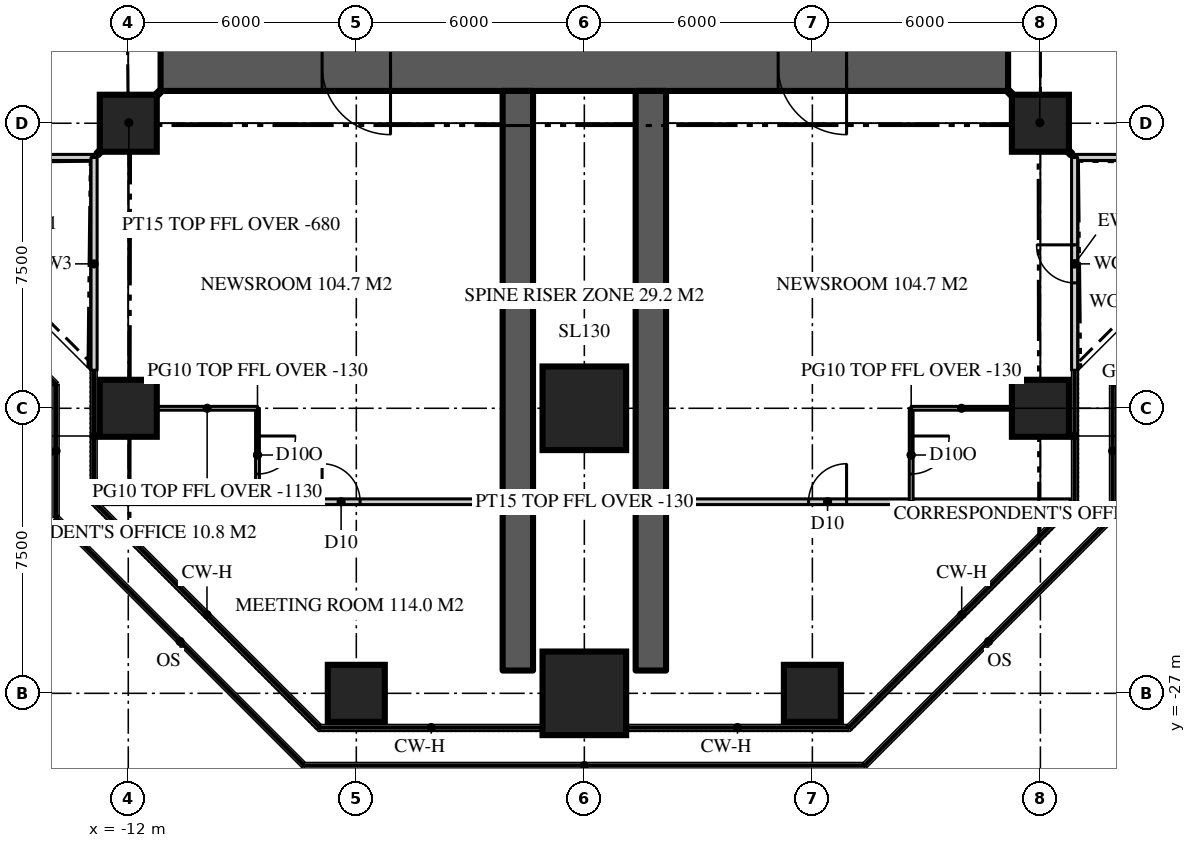
"""IFC4 building model, lengths in metres.
Left out: names, types, materials, properties, quantities, classifications, styles, units other than length and angle.
Written with IfcOpenShell. Run it as: python <this file> out.ifc"""

import sys

from ifc_helpers import new_model, si_unit, direction, frame, frame_2d, origin, origin_2d, place, context, subcontext, project, spatial, rectangle, extrude, element, fill, save


model = new_model("IFC4")
c1 = context("Model", 3, precision=1e-05, world=origin(), true_north=direction((0.0, 1.0)))
c2 = subcontext(c1, "Body", "Model", "MODEL_VIEW")
j1 = project(units=[si_unit("LENGTHUNIT", "METRE"), si_unit("PLANEANGLEUNIT", "RADIAN")], contexts=[c1])
p1 = place(None, origin())
s1 = spatial("IfcSite", under=j1, at=p1, CompositionType="ELEMENT")
p2 = place(p1, origin())
s2 = spatial("IfcBuilding", under=s1, at=p2, CompositionType="ELEMENT")
p3 = place(p2, frame((0.0, 0.0, 240.0)))
s3 = spatial("IfcBuildingStorey", under=s2, at=p3, CompositionType="ELEMENT", Elevation=240.0)
p4 = place(p3, frame((11.15, -10.5, 0.0), z_axis=(0.0, 0.0, 1.0), x_axis=(-1.0, 0.0, 0.0)))
e1 = element("IfcWall", 1, at=p4, inside=s3, PredefinedType="SHEAR", context=c2, shape_type="SweptSolid", body=[
    extrude(rectangle(XDim=22.3, YDim=1.3, at=frame_2d((11.15, 0.0))), origin(), (0.0, 0.0, 1.0), 3.9),
])
p5 = place(p4, frame((16.25, 0.0, 0.0)))
e2 = element("IfcOpeningElement", 2, at=p5, cuts=e1, PredefinedType="OPENING", context=c2, shape_type="SweptSolid", body=[
    extrude(rectangle(XDim=1.8, YDim=2.2, at=frame_2d((0.9, 1.1))), frame((0.0, 0.66, 0.0), z_axis=(0.0, -1.0, 0.0), x_axis=(1.0, 0.0, 0.0)), (0.0, 0.0, 1.0), 1.32),
])
p6 = place(p4, frame((4.25, 0.0, 0.0)))
e3 = element("IfcOpeningElement", 3, at=p6, cuts=e1, PredefinedType="OPENING", context=c2, shape_type="SweptSolid", body=[
    extrude(rectangle(XDim=1.8, YDim=2.2, at=frame_2d((0.9, 1.1))), frame((0.0, 0.66, 0.0), z_axis=(0.0, -1.0, 0.0), x_axis=(1.0, 0.0, 0.0)), (0.0, 0.0, 1.0), 1.32),
])
for number, where, z_axis, x_axis in (
    (4, (-1.75, -11.15, 0.0), (0.0, 0.0, 1.0), (0.0, -1.0, 0.0)),
    (5, (1.75, -11.15, 0.0), (0.0, 0.0, 1.0), (0.0, -1.0, 0.0)),
):
    element("IfcWall", number, at=place(p3, frame(where, z_axis=z_axis, x_axis=x_axis)), inside=s3, PredefinedType="SHEAR", context=c2, shape_type="SweptSolid", body=[
        extrude(rectangle(XDim=15.25, YDim=0.8, at=frame_2d((7.625, 0.0))), origin(), (0.0, 0.0, 1.0), 3.9),
    ])
p7 = place(p3, frame((-6.0, -27.0, 0.0), z_axis=(0.0, 0.0, 1.0), x_axis=(1.0, 0.0, 0.0)))
e6 = element("IfcColumn", 6, at=p7, inside=s3, PredefinedType="COLUMN", context=c2, shape_type="SweptSolid", body=[
    extrude(rectangle(XDim=1.5, YDim=1.5, at=origin_2d()), origin(), (0.0, 0.0, 1.0), 3.9),
])
p8 = place(p3, frame((0.0, -27.0, 0.0), z_axis=(0.0, 0.0, 1.0), x_axis=(1.0, 0.0, 0.0)))
e7 = element("IfcColumn", 7, at=p8, inside=s3, PredefinedType="COLUMN", context=c2, shape_type="SweptSolid", body=[
    extrude(rectangle(XDim=2.2, YDim=2.2, at=origin_2d()), origin(), (0.0, 0.0, 1.0), 3.9),
])
for number, where, z_axis, x_axis in (
    (8, (6.0, -27.0, 0.0), (0.0, 0.0, 1.0), (1.0, 0.0, 0.0)),
    (9, (-12.0, -19.5, 0.0), (0.0, 0.0, 1.0), (1.0, 0.0, 0.0)),
):
    element("IfcColumn", number, at=place(p3, frame(where, z_axis=z_axis, x_axis=x_axis)), inside=s3, PredefinedType="COLUMN", context=c2, shape_type="SweptSolid", body=[
        extrude(rectangle(XDim=1.5, YDim=1.5, at=origin_2d()), origin(), (0.0, 0.0, 1.0), 3.9),
    ])
p9 = place(p3, frame((0.0, -19.5, 0.0), z_axis=(0.0, 0.0, 1.0), x_axis=(1.0, 0.0, 0.0)))
e10 = element("IfcColumn", 10, at=p9, inside=s3, PredefinedType="COLUMN", context=c2, shape_type="SweptSolid", body=[
    extrude(rectangle(XDim=2.2, YDim=2.2, at=origin_2d()), origin(), (0.0, 0.0, 1.0), 3.9),
])
for number, where, z_axis, x_axis in (
    (11, (12.0, -19.5, 0.0), (0.0, 0.0, 1.0), (1.0, 0.0, 0.0)),
    (12, (-12.0, -12.0, 0.0), (0.0, 0.0, 1.0), (1.0, 0.0, 0.0)),
    (13, (12.0, -12.0, 0.0), (0.0, 0.0, 1.0), (1.0, 0.0, 0.0)),
):
    element("IfcColumn", number, at=place(p3, frame(where, z_axis=z_axis, x_axis=x_axis)), inside=s3, PredefinedType="COLUMN", context=c2, shape_type="SweptSolid", body=[
        extrude(rectangle(XDim=1.5, YDim=1.5, at=origin_2d()), origin(), (0.0, 0.0, 1.0), 3.9),
    ])
p10 = place(p3, frame((12.9, -12.9, 0.0), z_axis=(0.0, 0.0, 1.0), x_axis=(1.0, 0.0, 0.0)))
e14 = element("IfcWall", 14, at=p10, inside=s3, PredefinedType="SOLIDWALL", context=c2, shape_type="SweptSolid", body=[
    extrude(rectangle(XDim=5.6, YDim=0.16, at=frame_2d((2.8, 0.0))), origin(), (0.0, 0.0, 1.0), 3.77),
])
p11 = place(p3, frame((-18.5, -12.9, 0.0), z_axis=(0.0, 0.0, 1.0), x_axis=(1.0, 0.0, 0.0)))
e15 = element("IfcWall", 15, at=p11, inside=s3, PredefinedType="SOLIDWALL", context=c2, shape_type="SweptSolid", body=[
    extrude(rectangle(XDim=5.6, YDim=0.16, at=frame_2d((2.8, 0.0))), origin(), (0.0, 0.0, 1.0), 3.77),
])
p12 = place(p11, frame((2.3, 0.0, 0.0)))
e16 = element("IfcOpeningElement", 16, at=p12, cuts=e15, PredefinedType="OPENING", context=c2, shape_type="SweptSolid", body=[
    extrude(rectangle(XDim=1.0, YDim=2.2, at=frame_2d((0.5, 1.1))), frame((0.0, 0.09, 0.0), z_axis=(0.0, -1.0, 0.0), x_axis=(1.0, 0.0, 0.0)), (0.0, 0.0, 1.0), 0.18),
])
p13 = place(p3, frame((-12.9, -12.9, 0.0), z_axis=(0.0, 0.0, 1.0), x_axis=(0.0, -1.0, 0.0)))
e17 = element("IfcWall", 17, at=p13, inside=s3, PredefinedType="SOLIDWALL", context=c2, shape_type="SweptSolid", body=[
    extrude(rectangle(XDim=5.6, YDim=0.16, at=frame_2d((2.8, 0.0))), origin(), (0.0, 0.0, 1.0), 3.77),
])
p14 = place(p3, frame((12.9, -18.5, 0.0), z_axis=(0.0, 0.0, 1.0), x_axis=(0.0, 1.0, 0.0)))
e18 = element("IfcWall", 18, at=p14, inside=s3, PredefinedType="SOLIDWALL", context=c2, shape_type="SweptSolid", body=[
    extrude(rectangle(XDim=5.6, YDim=0.16, at=frame_2d((2.8, 0.0))), origin(), (0.0, 0.0, 1.0), 3.77),
])
p15 = place(p14, frame((2.3, 0.0, 0.0)))
e19 = element("IfcOpeningElement", 19, at=p15, cuts=e18, PredefinedType="OPENING", context=c2, shape_type="SweptSolid", body=[
    extrude(rectangle(XDim=1.0, YDim=2.2, at=frame_2d((0.5, 1.1))), frame((0.0, 0.09, 0.0), z_axis=(0.0, -1.0, 0.0), x_axis=(1.0, 0.0, 0.0)), (0.0, 0.0, 1.0), 0.18),
])
p16 = place(p3, frame((-12.786, -21.959, 0.0), z_axis=(0.0, 0.0, 1.0), x_axis=(1.0, 0.0, 0.0)))
e20 = element("IfcWall", 20, at=p16, inside=s3, PredefinedType="PARTITIONING", context=c2, shape_type="SweptSolid", body=[
    extrude(rectangle(XDim=25.573, YDim=0.15, at=frame_2d((12.786, 0.0))), origin(), (0.0, 0.0, 1.0), 3.77),
])
p17 = place(p16, frame((18.687, 0.0, 0.0)))
e21 = element("IfcOpeningElement", 21, at=p17, cuts=e20, PredefinedType="OPENING", context=c2, shape_type="SweptSolid", body=[
    extrude(rectangle(XDim=1.0, YDim=2.2, at=frame_2d((0.5, 1.1))), frame((0.0, 0.085, 0.0), z_axis=(0.0, -1.0, 0.0), x_axis=(1.0, 0.0, 0.0)), (0.0, 0.0, 1.0), 0.17),
])
p18 = place(p16, frame((5.886, 0.0, 0.0)))
e22 = element("IfcOpeningElement", 22, at=p18, cuts=e20, PredefinedType="OPENING", context=c2, shape_type="SweptSolid", body=[
    extrude(rectangle(XDim=1.0, YDim=2.2, at=frame_2d((0.5, 1.1))), frame((0.0, 0.085, 0.0), z_axis=(0.0, -1.0, 0.0), x_axis=(1.0, 0.0, 0.0)), (0.0, 0.0, 1.0), 0.17),
])
p19 = place(p3, frame((8.6, -19.5, 0.0), z_axis=(0.0, 0.0, 1.0), x_axis=(0.0, -1.0, 0.0)))
e23 = element("IfcWall", 23, at=p19, inside=s3, PredefinedType="PARTITIONING", context=c2, shape_type="SweptSolid", body=[
    extrude(rectangle(XDim=2.459, YDim=0.1, at=frame_2d((1.229, 0.0))), origin(), (0.0, 0.0, 1.0), 3.77),
])
p20 = place(p19, frame((0.729, 0.0, 0.0)))
e24 = element("IfcOpeningElement", 24, at=p20, cuts=e23, PredefinedType="OPENING", context=c2, shape_type="SweptSolid", body=[
    extrude(rectangle(XDim=1.0, YDim=2.2, at=frame_2d((0.5, 1.1))), frame((0.0, 0.06, 0.0), z_axis=(0.0, -1.0, 0.0), x_axis=(1.0, 0.0, 0.0)), (0.0, 0.0, 1.0), 0.12),
])
p21 = place(p3, frame((8.6, -19.5, 0.0), z_axis=(0.0, 0.0, 1.0), x_axis=(1.0, 0.0, 0.0)))
e25 = element("IfcWall", 25, at=p21, inside=s3, PredefinedType="PARTITIONING", context=c2, shape_type="SweptSolid", body=[
    extrude(rectangle(XDim=2.65, YDim=0.1, at=frame_2d((1.325, 0.0))), origin(), (0.0, 0.0, 1.0), 2.77),
])
p22 = place(p3, frame((-8.6, -19.5, 0.0), z_axis=(0.0, 0.0, 1.0), x_axis=(0.0, -1.0, 0.0)))
e26 = element("IfcWall", 26, at=p22, inside=s3, PredefinedType="PARTITIONING", context=c2, shape_type="SweptSolid", body=[
    extrude(rectangle(XDim=2.459, YDim=0.1, at=frame_2d((1.229, 0.0))), origin(), (0.0, 0.0, 1.0), 3.77),
])
p23 = place(p22, frame((0.729, 0.0, 0.0)))
e27 = element("IfcOpeningElement", 27, at=p23, cuts=e26, PredefinedType="OPENING", context=c2, shape_type="SweptSolid", body=[
    extrude(rectangle(XDim=1.0, YDim=2.2, at=frame_2d((0.5, 1.1))), frame((0.0, 0.06, 0.0), z_axis=(0.0, -1.0, 0.0), x_axis=(1.0, 0.0, 0.0)), (0.0, 0.0, 1.0), 0.12),
])
p24 = place(p3, frame((-8.6, -19.5, 0.0), z_axis=(0.0, 0.0, 1.0), x_axis=(-1.0, 0.0, 0.0)))
e28 = element("IfcWall", 28, at=p24, inside=s3, PredefinedType="PARTITIONING", context=c2, shape_type="SweptSolid", body=[
    extrude(rectangle(XDim=2.65, YDim=0.1, at=frame_2d((1.325, 0.0))), origin(), (0.0, 0.0, 1.0), 2.77),
])
for number, where, z_axis, x_axis in (
    (29, (-11.15, -11.15, 0.0), (0.0, 0.0, 1.0), (-0.707, -0.707, 0.0)),
    (30, (11.15, -11.15, 0.0), (0.0, 0.0, 1.0), (0.707, -0.707, 0.0)),
):
    element("IfcWall", number, at=place(p3, frame(where, z_axis=z_axis, x_axis=x_axis)), inside=s3, PredefinedType="PARTITIONING", context=c2, shape_type="SweptSolid", body=[
        extrude(rectangle(XDim=2.362, YDim=0.15, at=frame_2d((1.181, 0.0))), origin(), (0.0, 0.0, 1.0), 3.22),
    ])
p25 = place(p15, origin())
e31 = element("IfcDoor", 31, at=p25, inside=s3, OperationType="SINGLE_SWING_RIGHT", PredefinedType="DOOR", context=c2, shape_type="SweptSolid", body=[
    extrude(rectangle(XDim=1.0, YDim=2.2, at=frame_2d((0.5, 1.1))), frame((0.0, 0.025, 0.0), z_axis=(0.0, -1.0, 0.0), x_axis=(1.0, 0.0, 0.0)), (0.0, 0.0, 1.0), 0.05),
])
fill(e19, e31)
p26 = place(p5, origin())
e32 = element("IfcDoor", 32, at=p26, inside=s3, OperationType="DOUBLE_DOOR_DOUBLE_SWING", PredefinedType="DOOR", context=c2, shape_type="SweptSolid", body=[
    extrude(rectangle(XDim=1.8, YDim=2.2, at=frame_2d((0.9, 1.1))), frame((0.0, 0.025, 0.0), z_axis=(0.0, -1.0, 0.0), x_axis=(1.0, 0.0, 0.0)), (0.0, 0.0, 1.0), 0.05),
])
fill(e2, e32)
p27 = place(p6, origin())
e33 = element("IfcDoor", 33, at=p27, inside=s3, OperationType="DOUBLE_DOOR_DOUBLE_SWING", PredefinedType="DOOR", context=c2, shape_type="SweptSolid", body=[
    extrude(rectangle(XDim=1.8, YDim=2.2, at=frame_2d((0.9, 1.1))), frame((0.0, 0.025, 0.0), z_axis=(0.0, -1.0, 0.0), x_axis=(1.0, 0.0, 0.0)), (0.0, 0.0, 1.0), 0.05),
])
fill(e3, e33)
p28 = place(p17, origin())
e34 = element("IfcDoor", 34, at=p28, inside=s3, OperationType="SINGLE_SWING_RIGHT", PredefinedType="DOOR", context=c2, shape_type="SweptSolid", body=[
    extrude(rectangle(XDim=1.0, YDim=2.2, at=frame_2d((0.5, 1.1))), frame((0.0, 0.025, 0.0), z_axis=(0.0, -1.0, 0.0), x_axis=(1.0, 0.0, 0.0)), (0.0, 0.0, 1.0), 0.05),
])
fill(e21, e34)
p29 = place(p18, origin())
e35 = element("IfcDoor", 35, at=p29, inside=s3, OperationType="SINGLE_SWING_LEFT", PredefinedType="DOOR", context=c2, shape_type="SweptSolid", body=[
    extrude(rectangle(XDim=1.0, YDim=2.2, at=frame_2d((0.5, 1.1))), frame((0.0, 0.025, 0.0), z_axis=(0.0, -1.0, 0.0), x_axis=(1.0, 0.0, 0.0)), (0.0, 0.0, 1.0), 0.05),
])
fill(e22, e35)
p30 = place(p20, origin())
e36 = element("IfcDoor", 36, at=p30, inside=s3, OperationType="SINGLE_SWING_LEFT", PredefinedType="DOOR", context=c2, shape_type="SweptSolid", body=[
    extrude(rectangle(XDim=1.0, YDim=2.2, at=frame_2d((0.5, 1.1))), frame((0.0, 0.025, 0.0), z_axis=(0.0, -1.0, 0.0), x_axis=(1.0, 0.0, 0.0)), (0.0, 0.0, 1.0), 0.05),
])
fill(e24, e36)
p31 = place(p23, origin())
e37 = element("IfcDoor", 37, at=p31, inside=s3, OperationType="SINGLE_SWING_LEFT", PredefinedType="DOOR", context=c2, shape_type="SweptSolid", body=[
    extrude(rectangle(XDim=1.0, YDim=2.2, at=frame_2d((0.5, 1.1))), frame((0.0, 0.025, 0.0), z_axis=(0.0, -1.0, 0.0), x_axis=(1.0, 0.0, 0.0)), (0.0, 0.0, 1.0), 0.05),
])
fill(e27, e37)
save(model, sys.argv[1])
